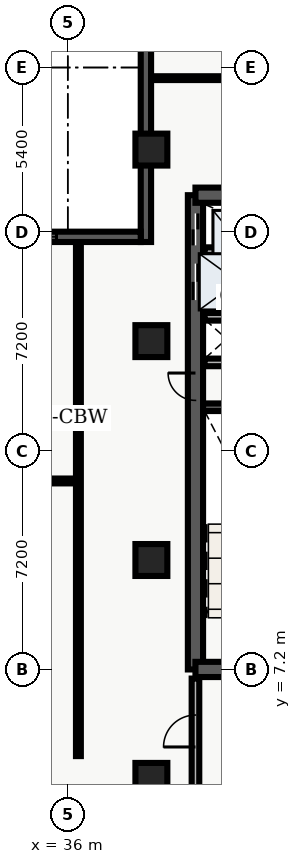
"""IFC4 building model, lengths in metres.
Left out: names, types, materials, properties, quantities, classifications, styles, units other than length and angle.
Written with IfcOpenShell. Run it as: python <this file> out.ifc"""

import sys

from ifc_helpers import new_model, entity, si_unit, converted_unit, direction, frame, origin_with_axes, origin_2d_with_axis, place, context, subcontext, project, spatial, polyline, rectangle, outline, extrude, element, fill, save


model = new_model("IFC4")
c1 = context("Model", 3, precision=1e-05, world=origin_with_axes(), true_north=direction((0.0, 1.0)))
c2 = subcontext(c1, "Body", "Model", "MODEL_VIEW")
j1 = project(units=[si_unit("LENGTHUNIT", "METRE"), converted_unit("PLANEANGLEUNIT", "DEGREE", entity("IfcPlaneAngleMeasure", 0.017), si_unit("PLANEANGLEUNIT", "RADIAN"), dimensions=[0, 0, 0, 0, 0, 0, 0])], contexts=[c1])
p1 = place(None, origin_with_axes())
s1 = spatial("IfcSite", under=j1, at=p1, CompositionType="ELEMENT")
p2 = place(p1, origin_with_axes())
s2 = spatial("IfcBuilding", under=s1, at=p2, CompositionType="ELEMENT")
p3 = place(p2, frame((0.0, 0.0, 175.8), z_axis=(0.0, 0.0, 1.0), x_axis=(1.0, 0.0, 0.0)))
s3 = spatial("IfcBuildingStorey", under=s2, at=p3, CompositionType="ELEMENT", Elevation=175.8)
p4 = place(p3, frame((40.2, 7.2, 0.0), z_axis=(0.0, 0.0, 1.0), x_axis=(0.0, 1.0, 0.0)))
e1 = element("IfcWall", 1, at=p4, inside=s3, PredefinedType="SHEAR", context=c2, shape_type="SweptSolid", body=[
    extrude(outline(polyline([(0.0, -0.25), (15.6, -0.25), (15.6, 0.25), (0.0, 0.25), (0.0, -0.25)])), origin_with_axes(), (0.0, 0.0, 1.0), 3.66),
])
p5 = place(p4, frame((14.475, 0.0, 0.0), z_axis=(0.0, 0.0, 1.0), x_axis=(1.0, 0.0, 0.0)))
e2 = element("IfcOpeningElement", 2, at=p5, cuts=e1, PredefinedType="OPENING", context=c2, shape_type="SweptSolid", body=[
    extrude(rectangle(XDim=1.05, YDim=0.52, at=origin_2d_with_axis()), origin_with_axes(), (0.0, 0.0, 1.0), 2.15),
])
p6 = place(p4, frame((12.75, 0.0, 0.0), z_axis=(0.0, 0.0, 1.0), x_axis=(1.0, 0.0, 0.0)))
e3 = element("IfcOpeningElement", 3, at=p6, cuts=e1, PredefinedType="OPENING", context=c2, shape_type="SweptSolid", body=[
    extrude(rectangle(XDim=1.2, YDim=0.52, at=origin_2d_with_axis()), origin_with_axes(), (0.0, 0.0, 1.0), 2.15),
])
p7 = place(p4, frame((9.3, 0.0, 0.0), z_axis=(0.0, 0.0, 1.0), x_axis=(1.0, 0.0, 0.0)))
e4 = element("IfcOpeningElement", 4, at=p7, cuts=e1, PredefinedType="OPENING", context=c2, shape_type="SweptSolid", body=[
    extrude(rectangle(XDim=0.9, YDim=0.52, at=origin_2d_with_axis()), origin_with_axes(), (0.0, 0.0, 1.0), 2.15),
])
p8 = place(p3, frame((40.2, 7.2, 0.0), z_axis=(0.0, 0.0, 1.0), x_axis=(1.0, 0.0, 0.0)))
e5 = element("IfcWall", 5, at=p8, inside=s3, PredefinedType="SHEAR", context=c2, shape_type="SweptSolid", body=[
    extrude(outline(polyline([(0.0, -0.25), (7.85, -0.25), (7.85, 0.25), (0.0, 0.25), (0.0, -0.25)])), origin_with_axes(), (0.0, 0.0, 1.0), 3.66),
])
p9 = place(p8, frame((2.175, 0.0, 0.0), z_axis=(0.0, 0.0, 1.0), x_axis=(1.0, 0.0, 0.0)))
e6 = element("IfcOpeningElement", 6, at=p9, cuts=e5, PredefinedType="OPENING", context=c2, shape_type="SweptSolid", body=[
    extrude(rectangle(XDim=1.05, YDim=0.52, at=origin_2d_with_axis()), origin_with_axes(), (0.0, 0.0, 1.0), 2.15),
])
p10 = place(p3, frame((40.2, 22.8, 0.0), z_axis=(0.0, 0.0, 1.0), x_axis=(1.0, 0.0, 0.0)))
e7 = element("IfcWall", 7, at=p10, inside=s3, PredefinedType="SHEAR", context=c2, shape_type="SweptSolid", body=[
    extrude(outline(polyline([(0.0, -0.25), (7.85, -0.25), (7.85, 0.25), (0.0, 0.25), (0.0, -0.25)])), origin_with_axes(), (0.0, 0.0, 1.0), 3.66),
])
p11 = place(p10, frame((5.775, 0.0, 0.0), z_axis=(0.0, 0.0, 1.0), x_axis=(1.0, 0.0, 0.0)))
e8 = element("IfcOpeningElement", 8, at=p11, cuts=e7, PredefinedType="OPENING", context=c2, shape_type="SweptSolid", body=[
    extrude(rectangle(XDim=1.05, YDim=0.52, at=origin_2d_with_axis()), origin_with_axes(), (0.0, 0.0, 1.0), 2.15),
])
p12 = place(p3, frame((40.45, 15.825, 0.0), z_axis=(0.0, 0.0, 1.0), x_axis=(1.0, 0.0, 0.0)))
e9 = element("IfcWall", 9, at=p12, inside=s3, PredefinedType="SHEAR", context=c2, shape_type="SweptSolid", body=[
    extrude(outline(polyline([(0.0, -0.125), (3.55, -0.125), (3.55, 0.125), (0.0, 0.125), (0.0, -0.125)])), origin_with_axes(), (0.0, 0.0, 1.0), 3.66),
])
p13 = place(p3, frame((40.5, 17.3, 0.0), z_axis=(0.0, 0.0, 1.0), x_axis=(1.0, 0.0, 0.0)))
e10 = element("IfcWall", 10, at=p13, inside=s3, PredefinedType="SOLIDWALL", context=c2, shape_type="SweptSolid", body=[
    extrude(outline(polyline([(0.0, -0.125), (3.5, -0.125), (3.5, 0.125), (0.0, 0.125), (0.0, -0.125)])), origin_with_axes(), (0.0, 0.0, 1.0), 2.7),
])
p14 = place(p13, frame((2.4, 0.0, 0.0), z_axis=(0.0, 0.0, 1.0), x_axis=(1.0, 0.0, 0.0)))
e11 = element("IfcOpeningElement", 11, at=p14, cuts=e10, PredefinedType="OPENING", context=c2, shape_type="SweptSolid", body=[
    extrude(rectangle(XDim=0.9, YDim=0.27, at=origin_2d_with_axis()), origin_with_axes(), (0.0, 0.0, 1.0), 2.15),
])
p15 = place(p3, frame((40.5, 18.8, 0.0), z_axis=(0.0, 0.0, 1.0), x_axis=(1.0, 0.0, 0.0)))
e12 = element("IfcWall", 12, at=p15, inside=s3, PredefinedType="SOLIDWALL", context=c2, shape_type="SweptSolid", body=[
    extrude(outline(polyline([(0.0, -0.125), (3.5, -0.125), (3.5, 0.125), (0.0, 0.125), (0.0, -0.125)])), origin_with_axes(), (0.0, 0.0, 1.0), 2.7),
])
p16 = place(p3, frame((40.2, 3.1, 0.0), z_axis=(0.0, 0.0, 1.0), x_axis=(0.0, 1.0, 0.0)))
e13 = element("IfcWall", 13, at=p16, inside=s3, PredefinedType="SOLIDWALL", context=c2, shape_type="SweptSolid", body=[
    extrude(outline(polyline([(0.0, -0.125), (3.8, -0.125), (3.8, 0.125), (0.0, 0.125), (0.0, -0.125)])), origin_with_axes(), (0.0, 0.0, 1.0), 2.7),
])
p17 = place(p16, frame((2.075, 0.0, 0.0), z_axis=(0.0, 0.0, 1.0), x_axis=(1.0, 0.0, 0.0)))
e14 = element("IfcOpeningElement", 14, at=p17, cuts=e13, PredefinedType="OPENING", context=c2, shape_type="SweptSolid", body=[
    extrude(rectangle(XDim=1.05, YDim=0.27, at=origin_2d_with_axis()), origin_with_axes(), (0.0, 0.0, 1.0), 2.15),
])
for number, where, z_axis, x_axis in (
    (15, (38.75, 3.6, 0.0), (0.0, 0.0, 1.0), (1.0, 0.0, 0.0)),
    (16, (38.75, 10.8, 0.0), (0.0, 0.0, 1.0), (1.0, 0.0, 0.0)),
    (17, (38.75, 18.0, 0.0), (0.0, 0.0, 1.0), (1.0, 0.0, 0.0)),
    (18, (38.75, 24.3, 0.0), (0.0, 0.0, 1.0), (1.0, 0.0, 0.0)),
):
    element("IfcColumn", number, at=place(p3, frame(where, z_axis=z_axis, x_axis=x_axis)), inside=s3, PredefinedType="COLUMN", context=c2, shape_type="SweptSolid", body=[
        extrude(rectangle(XDim=1.05, YDim=1.05, at=origin_2d_with_axis()), origin_with_axes(), (0.0, 0.0, 1.0), 3.9),
    ])
p18 = place(p3, frame((40.5, 20.96, 0.0), z_axis=(0.0, 0.0, 1.0), x_axis=(1.0, 0.0, 0.0)))
e19 = element("IfcWall", 19, at=p18, inside=s3, PredefinedType="SOLIDWALL", context=c2, shape_type="SweptSolid", body=[
    extrude(outline(polyline([(0.0, -0.125), (3.5, -0.125), (3.5, 0.125), (0.0, 0.125), (0.0, -0.125)])), origin_with_axes(), (0.0, 0.0, 1.0), 2.7),
])
p19 = place(p3, frame((21.15, 13.4, 0.0), z_axis=(0.0, 0.0, 1.0), x_axis=(1.0, 0.0, 0.0)))
e20 = element("IfcWall", 20, at=p19, inside=s3, PredefinedType="PARTITIONING", context=c2, shape_type="SweptSolid", body=[
    extrude(outline(polyline([(0.0, -0.08), (15.2, -0.08), (15.2, 0.08), (0.0, 0.08), (0.0, -0.08)])), origin_with_axes(), (0.0, 0.0, 1.0), 2.7),
])
p20 = place(p19, frame((7.65, 0.0, 0.0), z_axis=(0.0, 0.0, 1.0), x_axis=(1.0, 0.0, 0.0)))
e21 = element("IfcOpeningElement", 21, at=p20, cuts=e20, PredefinedType="OPENING", context=c2, shape_type="SweptSolid", body=[
    extrude(rectangle(XDim=1.2, YDim=0.18, at=origin_2d_with_axis()), origin_with_axes(), (0.0, 0.0, 1.0), 2.2),
])
p21 = place(p3, frame((21.15, 15.7, 0.0), z_axis=(0.0, 0.0, 1.0), x_axis=(1.0, 0.0, 0.0)))
e22 = element("IfcWall", 22, at=p21, inside=s3, PredefinedType="PARTITIONING", context=c2, shape_type="SweptSolid", body=[
    extrude(outline(polyline([(0.0, -0.08), (15.2, -0.08), (15.2, 0.08), (0.0, 0.08), (0.0, -0.08)])), origin_with_axes(), (0.0, 0.0, 1.0), 2.7),
])
p22 = place(p21, frame((2.31, 0.0, 0.0), z_axis=(0.0, 0.0, 1.0), x_axis=(1.0, 0.0, 0.0)))
e23 = element("IfcOpeningElement", 23, at=p22, cuts=e22, PredefinedType="OPENING", context=c2, shape_type="SweptSolid", body=[
    extrude(rectangle(XDim=1.0, YDim=0.18, at=origin_2d_with_axis()), origin_with_axes(), (0.0, 0.0, 1.0), 2.15),
])
p23 = place(p21, frame((6.909, 0.0, 0.0), z_axis=(0.0, 0.0, 1.0), x_axis=(1.0, 0.0, 0.0)))
e24 = element("IfcOpeningElement", 24, at=p23, cuts=e22, PredefinedType="OPENING", context=c2, shape_type="SweptSolid", body=[
    extrude(rectangle(XDim=1.0, YDim=0.18, at=origin_2d_with_axis()), origin_with_axes(), (0.0, 0.0, 1.0), 2.15),
])
p24 = place(p21, frame((12.249, 0.0, 0.0), z_axis=(0.0, 0.0, 1.0), x_axis=(1.0, 0.0, 0.0)))
e25 = element("IfcOpeningElement", 25, at=p24, cuts=e22, PredefinedType="OPENING", context=c2, shape_type="SweptSolid", body=[
    extrude(rectangle(XDim=1.0, YDim=0.18, at=origin_2d_with_axis()), origin_with_axes(), (0.0, 0.0, 1.0), 2.15),
])
p25 = place(p3, frame((36.35, 4.35, 0.0), z_axis=(0.0, 0.0, 1.0), x_axis=(0.0, 1.0, 0.0)))
e26 = element("IfcWall", 26, at=p25, inside=s3, PredefinedType="PARTITIONING", context=c2, shape_type="SweptSolid", body=[
    extrude(outline(polyline([(0.0, -0.08), (16.95, -0.08), (16.95, 0.08), (0.0, 0.08), (0.0, -0.08)])), origin_with_axes(), (0.0, 0.0, 1.0), 2.7),
])
p26 = place(p3, frame((38.735, 26.65, 0.0), z_axis=(0.0, 0.0, 1.0), x_axis=(1.0, 0.0, 0.0)))
e27 = element("IfcWall", 27, at=p26, inside=s3, PredefinedType="PARTITIONING", context=c2, shape_type="SweptSolid", body=[
    extrude(outline(polyline([(0.0, -0.062), (20.905, -0.062), (20.905, 0.062), (0.0, 0.062), (0.0, -0.062)])), origin_with_axes(), (0.0, 0.0, 1.0), 2.7),
])
p27 = place(p26, frame((4.265, 0.0, 0.0), z_axis=(0.0, 0.0, 1.0), x_axis=(1.0, 0.0, 0.0)))
e28 = element("IfcOpeningElement", 28, at=p27, cuts=e27, PredefinedType="OPENING", context=c2, shape_type="SweptSolid", body=[
    extrude(rectangle(XDim=1.0, YDim=0.145, at=origin_2d_with_axis()), origin_with_axes(), (0.0, 0.0, 1.0), 2.15),
])
p28 = place(p3, frame((38.57, 21.26, 0.0), z_axis=(0.0, 0.0, 1.0), x_axis=(0.0, 1.0, 0.0)))
e29 = element("IfcWall", 29, at=p28, inside=s3, PredefinedType="SOLIDWALL", context=c2, shape_type="SweptSolid", body=[
    extrude(outline(polyline([(0.0, -0.17), (7.54, -0.17), (7.54, 0.17), (0.0, 0.17), (0.0, -0.17)])), origin_with_axes(), (0.0, 0.0, 1.0), 3.66),
])
p29 = place(p3, frame((24.913, 21.43, 0.0), z_axis=(0.0, 0.0, 1.0), x_axis=(1.0, 0.0, 0.0)))
e30 = element("IfcWall", 30, at=p29, inside=s3, PredefinedType="SOLIDWALL", context=c2, shape_type="SweptSolid", body=[
    extrude(outline(polyline([(0.0, -0.17), (13.487, -0.17), (13.487, 0.17), (0.0, 0.17), (0.0, -0.17)])), origin_with_axes(), (0.0, 0.0, 1.0), 3.66),
])
p30 = place(p29, frame((3.672, 0.0, 0.45), z_axis=(0.0, 0.0, 1.0), x_axis=(1.0, 0.0, 0.0)))
e31 = element("IfcOpeningElement", 31, at=p30, cuts=e30, PredefinedType="OPENING", context=c2, shape_type="SweptSolid", body=[
    extrude(rectangle(XDim=1.8, YDim=0.36, at=origin_2d_with_axis()), origin_with_axes(), (0.0, 0.0, 1.0), 2.1),
])
p31 = place(p29, frame((9.815, 0.0, 0.45), z_axis=(0.0, 0.0, 1.0), x_axis=(1.0, 0.0, 0.0)))
e32 = element("IfcOpeningElement", 32, at=p31, cuts=e30, PredefinedType="OPENING", context=c2, shape_type="SweptSolid", body=[
    extrude(rectangle(XDim=1.8, YDim=0.36, at=origin_2d_with_axis()), origin_with_axes(), (0.0, 0.0, 1.0), 2.1),
])
p32 = place(p4, frame((14.475, 0.0, 0.0), z_axis=(0.0, 0.0, 1.0), x_axis=(1.0, 0.0, 0.0)))
e33 = element("IfcDoor", 33, at=p32, inside=s3, OperationType="SLIDING_TO_RIGHT", PredefinedType="DOOR", context=c2, shape_type="SweptSolid", body=[
    extrude(rectangle(XDim=1.05, YDim=0.09, at=origin_2d_with_axis()), origin_with_axes(), (0.0, 0.0, 1.0), 2.15),
])
fill(e2, e33)
p33 = place(p4, frame((12.75, 0.0, 0.0), z_axis=(0.0, 0.0, 1.0), x_axis=(1.0, 0.0, 0.0)))
e34 = element("IfcDoor", 34, at=p33, inside=s3, OperationType="DOUBLE_DOOR_SLIDING", PredefinedType="DOOR", context=c2, shape_type="SweptSolid", body=[
    extrude(rectangle(XDim=1.2, YDim=0.09, at=origin_2d_with_axis()), origin_with_axes(), (0.0, 0.0, 1.0), 2.15),
])
fill(e3, e34)
p34 = place(p4, frame((9.3, 0.0, 0.0), z_axis=(0.0, 0.0, 1.0), x_axis=(1.0, 0.0, 0.0)))
e35 = element("IfcDoor", 35, at=p34, inside=s3, OperationType="SINGLE_SWING_RIGHT", PredefinedType="DOOR", context=c2, shape_type="SweptSolid", body=[
    extrude(rectangle(XDim=0.9, YDim=0.09, at=origin_2d_with_axis()), origin_with_axes(), (0.0, 0.0, 1.0), 2.15),
])
fill(e4, e35)
p35 = place(p16, frame((2.075, 0.0, 0.0), z_axis=(0.0, 0.0, 1.0), x_axis=(1.0, 0.0, 0.0)))
e36 = element("IfcDoor", 36, at=p35, inside=s3, OperationType="SINGLE_SWING_LEFT", PredefinedType="DOOR", context=c2, shape_type="SweptSolid", body=[
    extrude(rectangle(XDim=1.05, YDim=0.09, at=origin_2d_with_axis()), origin_with_axes(), (0.0, 0.0, 1.0), 2.15),
])
fill(e14, e36)
p36 = place(p29, frame((9.815, 0.0, 0.45), z_axis=(0.0, 0.0, 1.0), x_axis=(1.0, 0.0, 0.0)))
e37 = element("IfcWindow", 37, at=p36, inside=s3, PredefinedType="WINDOW", context=c2, shape_type="SweptSolid", body=[
    extrude(rectangle(XDim=1.8, YDim=0.09, at=origin_2d_with_axis()), origin_with_axes(), (0.0, 0.0, 1.0), 2.1),
])
fill(e32, e37)
save(model, sys.argv[1])
